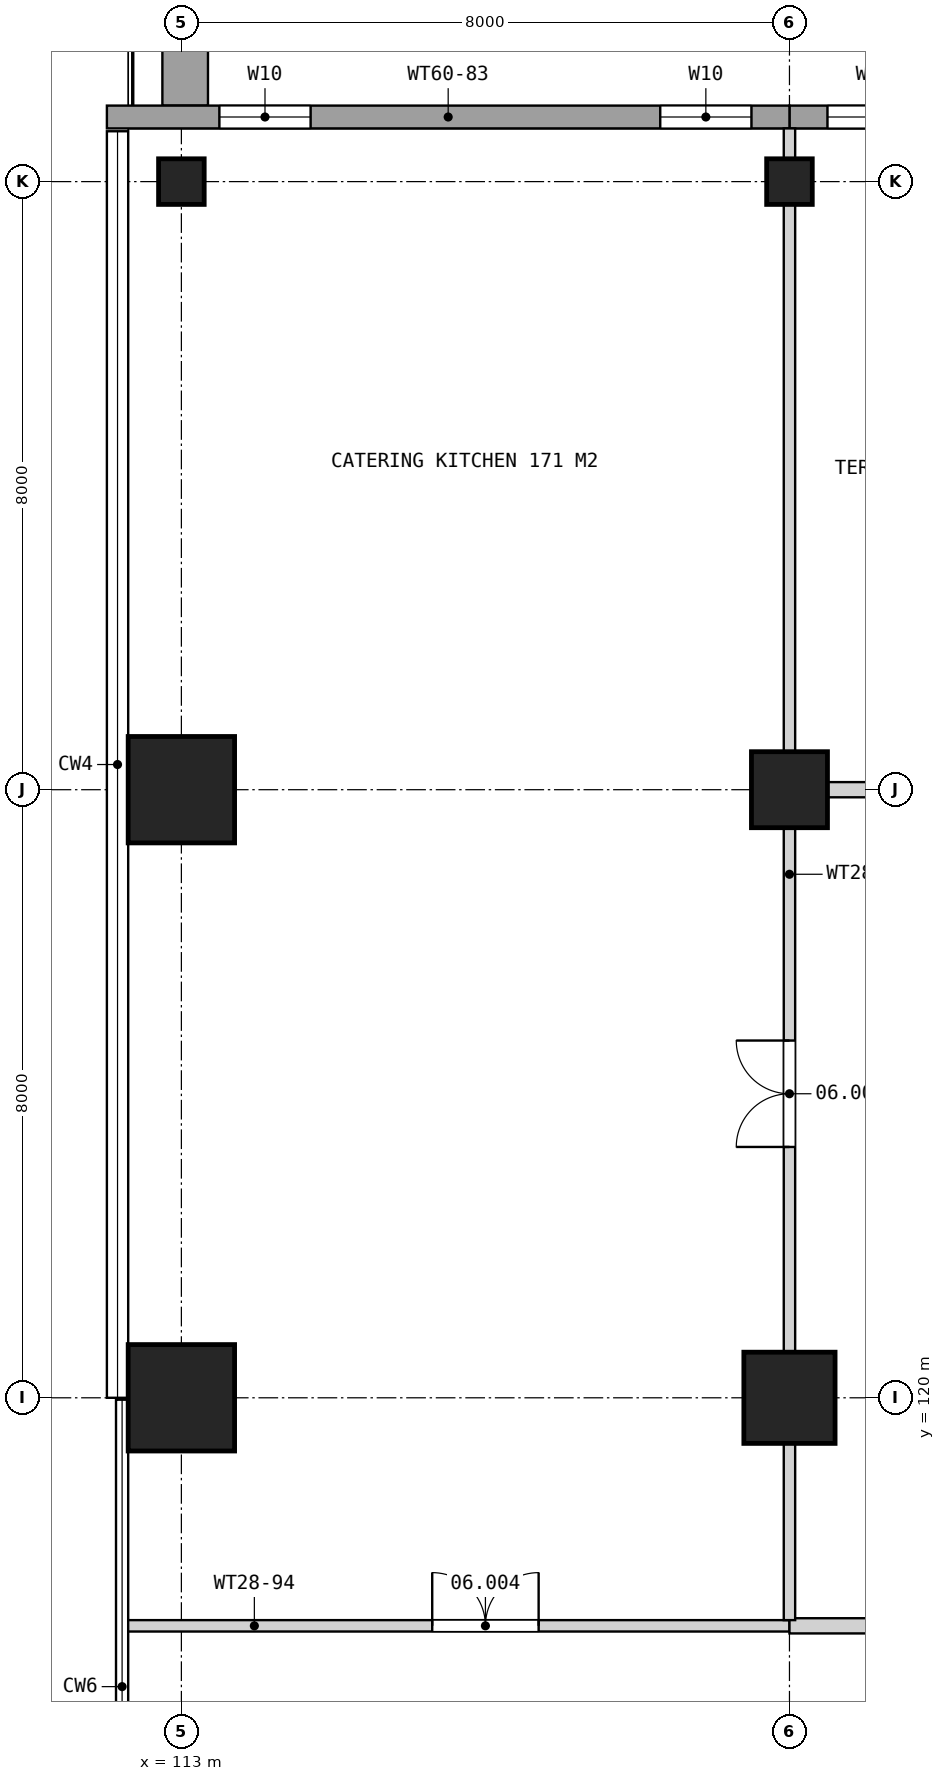
"""IFC4 building model, lengths in metres.
Left out: names, types, materials, properties, quantities, classifications, styles, units other than length and angle.
Written with IfcOpenShell. Run it as: python <this file> out.ifc"""

import sys

from ifc_helpers import new_model, si_unit, direction, frame, frame_2d, origin, origin_2d, place, context, subcontext, project, spatial, rectangle, extrude, element, fill, save


model = new_model("IFC4")
c1 = context("Model", 3, precision=1e-05, world=origin(), true_north=direction((0.0, 1.0)))
c2 = subcontext(c1, "Body", "Model", "MODEL_VIEW")
j1 = project(units=[si_unit("LENGTHUNIT", "METRE"), si_unit("PLANEANGLEUNIT", "RADIAN")], contexts=[c1])
p1 = place(None, origin())
s1 = spatial("IfcSite", under=j1, at=p1, CompositionType="ELEMENT")
p2 = place(p1, origin())
s2 = spatial("IfcBuilding", under=s1, at=p2, CompositionType="ELEMENT")
p3 = place(p2, frame((0.0, 0.0, 47.5)))
s3 = spatial("IfcBuildingStorey", under=s2, at=p3, CompositionType="ELEMENT", Elevation=47.5)
for number, where, z_axis, x_axis in (
    (1, (113.0, 120.0, 0.0), (0.0, 0.0, 1.0), (1.0, 0.0, 0.0)),
    (2, (113.0, 128.0, 0.0), (0.0, 0.0, 1.0), (1.0, 0.0, 0.0)),
):
    element("IfcColumn", number, at=place(p3, frame(where, z_axis=z_axis, x_axis=x_axis)), inside=s3, PredefinedType="COLUMN", context=c2, shape_type="SweptSolid", body=[
        extrude(rectangle(XDim=1.4, YDim=1.4, at=origin_2d()), origin(), (0.0, 0.0, 1.0), 6.0),
    ])
p4 = place(p3, frame((113.0, 136.0, 0.0), z_axis=(0.0, 0.0, 1.0), x_axis=(1.0, 0.0, 0.0)))
e3 = element("IfcColumn", 3, at=p4, inside=s3, PredefinedType="COLUMN", context=c2, shape_type="SweptSolid", body=[
    extrude(rectangle(XDim=0.6, YDim=0.6, at=origin_2d()), origin(), (0.0, 0.0, 1.0), 6.0),
])
p5 = place(p3, frame((121.0, 120.0, 5.2), z_axis=(0.0, 0.0, 1.0), x_axis=(1.0, 0.0, 0.0)))
e4 = element("IfcColumn", 4, at=p5, inside=s3, PredefinedType="COLUMN", context=c2, shape_type="SweptSolid", body=[
    extrude(rectangle(XDim=1.2, YDim=1.2, at=origin_2d()), origin(), (0.0, 0.0, 1.0), 0.8),
])
p6 = place(p3, frame((121.0, 128.0, 5.2), z_axis=(0.0, 0.0, 1.0), x_axis=(1.0, 0.0, 0.0)))
e5 = element("IfcColumn", 5, at=p6, inside=s3, PredefinedType="COLUMN", context=c2, shape_type="SweptSolid", body=[
    extrude(rectangle(XDim=1.0, YDim=1.0, at=origin_2d()), origin(), (0.0, 0.0, 1.0), 0.8),
])
p7 = place(p3, frame((121.0, 136.0, 5.2), z_axis=(0.0, 0.0, 1.0), x_axis=(1.0, 0.0, 0.0)))
e6 = element("IfcColumn", 6, at=p7, inside=s3, PredefinedType="COLUMN", context=c2, shape_type="SweptSolid", body=[
    extrude(rectangle(XDim=0.6, YDim=0.6, at=origin_2d()), origin(), (0.0, 0.0, 1.0), 0.8),
])
p8 = place(p3, frame((113.05, 137.0, 0.0), z_axis=(0.0, 0.0, 1.0), x_axis=(0.0, 1.0, 0.0)))
e7 = element("IfcWall", 7, at=p8, inside=s3, PredefinedType="SOLIDWALL", context=c2, shape_type="SweptSolid", body=[
    extrude(rectangle(XDim=7.25, YDim=0.6, at=frame_2d((3.625, 0.0))), origin(), (0.0, 0.0, 1.0), 0.6),
])
p9 = place(p3, frame((129.0, 136.85, 0.0), z_axis=(0.0, 0.0, 1.0), x_axis=(-1.0, 0.0, 0.0)))
e8 = element("IfcWall", 8, at=p9, inside=s3, PredefinedType="SOLIDWALL", context=c2, shape_type="SweptSolid", body=[
    extrude(rectangle(XDim=8.0, YDim=0.3, at=frame_2d((4.0, 0.0))), origin(), (0.0, 0.0, 1.0), 5.26),
])
p10 = place(p9, frame((2.8, 0.0, 0.0)))
e9 = element("IfcOpeningElement", 9, at=p10, cuts=e8, PredefinedType="OPENING", context=c2, shape_type="SweptSolid", body=[
    extrude(rectangle(XDim=2.4, YDim=2.4, at=frame_2d((1.2, 1.2))), frame((0.0, 0.16, 0.0), z_axis=(0.0, -1.0, 0.0), x_axis=(1.0, 0.0, 0.0)), (0.0, 0.0, 1.0), 0.32),
])
p11 = place(p9, frame((0.5, 0.0, 0.4)))
e10 = element("IfcOpeningElement", 10, at=p11, cuts=e8, PredefinedType="OPENING", context=c2, shape_type="SweptSolid", body=[
    extrude(rectangle(XDim=1.2, YDim=2.2, at=frame_2d((0.6, 1.1))), frame((0.0, 0.16, 0.0), z_axis=(0.0, -1.0, 0.0), x_axis=(1.0, 0.0, 0.0)), (0.0, 0.0, 1.0), 0.32),
])
p12 = place(p9, frame((6.3, 0.0, 0.4)))
e11 = element("IfcOpeningElement", 11, at=p12, cuts=e8, PredefinedType="OPENING", context=c2, shape_type="SweptSolid", body=[
    extrude(rectangle(XDim=1.2, YDim=2.2, at=frame_2d((0.6, 1.1))), frame((0.0, 0.16, 0.0), z_axis=(0.0, -1.0, 0.0), x_axis=(1.0, 0.0, 0.0)), (0.0, 0.0, 1.0), 0.32),
])
p13 = place(p3, frame((121.0, 136.85, 0.0), z_axis=(0.0, 0.0, 1.0), x_axis=(-1.0, 0.0, 0.0)))
e12 = element("IfcWall", 12, at=p13, inside=s3, PredefinedType="SOLIDWALL", context=c2, shape_type="SweptSolid", body=[
    extrude(rectangle(XDim=8.98, YDim=0.3, at=frame_2d((4.49, 0.0))), origin(), (0.0, 0.0, 1.0), 5.26),
])
p14 = place(p13, frame((0.5, 0.0, 0.4)))
e13 = element("IfcOpeningElement", 13, at=p14, cuts=e12, PredefinedType="OPENING", context=c2, shape_type="SweptSolid", body=[
    extrude(rectangle(XDim=1.2, YDim=2.2, at=frame_2d((0.6, 1.1))), frame((0.0, 0.16, 0.0), z_axis=(0.0, -1.0, 0.0), x_axis=(1.0, 0.0, 0.0)), (0.0, 0.0, 1.0), 0.32),
])
p15 = place(p13, frame((6.3, 0.0, 0.4)))
e14 = element("IfcOpeningElement", 14, at=p15, cuts=e12, PredefinedType="OPENING", context=c2, shape_type="SweptSolid", body=[
    extrude(rectangle(XDim=1.2, YDim=2.2, at=frame_2d((0.6, 1.1))), frame((0.0, 0.16, 0.0), z_axis=(0.0, -1.0, 0.0), x_axis=(1.0, 0.0, 0.0)), (0.0, 0.0, 1.0), 0.32),
])
p16 = place(p3, frame((112.2, 117.0, 0.0), z_axis=(0.0, 0.0, 1.0), x_axis=(1.0, 0.0, 0.0)))
e15 = element("IfcWall", 15, at=p16, inside=s3, PredefinedType="SOLIDWALL", context=c2, shape_type="SweptSolid", body=[
    extrude(rectangle(XDim=8.8, YDim=0.15, at=frame_2d((4.4, 0.0))), origin(), (0.0, 0.0, 1.0), 5.26),
])
p17 = place(p16, frame((4.1, 0.0, 0.0)))
e16 = element("IfcOpeningElement", 16, at=p17, cuts=e15, PredefinedType="OPENING", context=c2, shape_type="SweptSolid", body=[
    extrude(rectangle(XDim=1.4, YDim=2.2, at=frame_2d((0.7, 1.1))), frame((0.0, 0.085, 0.0), z_axis=(0.0, -1.0, 0.0), x_axis=(1.0, 0.0, 0.0)), (0.0, 0.0, 1.0), 0.17),
])
p18 = place(p3, frame((121.0, 117.0, 0.0), z_axis=(0.0, 0.0, 1.0), x_axis=(1.0, 0.0, 0.0)))
e17 = element("IfcWall", 17, at=p18, inside=s3, PredefinedType="PARTITIONING", context=c2, shape_type="SweptSolid", body=[
    extrude(rectangle(XDim=16.8, YDim=0.2, at=frame_2d((8.4, 0.0))), origin(), (0.0, 0.0, 1.0), 5.26),
])
p19 = place(p18, frame((3.1, 0.0, 0.0)))
e18 = element("IfcOpeningElement", 18, at=p19, cuts=e17, PredefinedType="OPENING", context=c2, shape_type="SweptSolid", body=[
    extrude(rectangle(XDim=1.8, YDim=2.4, at=frame_2d((0.9, 1.2))), frame((0.0, 0.11, 0.0), z_axis=(0.0, -1.0, 0.0), x_axis=(1.0, 0.0, 0.0)), (0.0, 0.0, 1.0), 0.22),
])
p20 = place(p18, frame((11.5, 0.0, 0.0)))
e19 = element("IfcOpeningElement", 19, at=p20, cuts=e17, PredefinedType="OPENING", context=c2, shape_type="SweptSolid", body=[
    extrude(rectangle(XDim=1.0, YDim=2.1, at=frame_2d((0.5, 1.05))), frame((0.0, 0.11, 0.0), z_axis=(0.0, -1.0, 0.0), x_axis=(1.0, 0.0, 0.0)), (0.0, 0.0, 1.0), 0.22),
])
p21 = place(p3, frame((121.075, 128.0, 0.0), z_axis=(0.0, 0.0, 1.0), x_axis=(1.0, 0.0, 0.0)))
e20 = element("IfcWall", 20, at=p21, inside=s3, PredefinedType="PARTITIONING", context=c2, shape_type="SweptSolid", body=[
    extrude(rectangle(XDim=7.85, YDim=0.2, at=frame_2d((3.925, 0.0))), origin(), (0.0, 0.0, 1.0), 2.7),
])
p22 = place(p21, frame((3.025, 0.0, 0.0)))
e21 = element("IfcOpeningElement", 21, at=p22, cuts=e20, PredefinedType="OPENING", context=c2, shape_type="SweptSolid", body=[
    extrude(rectangle(XDim=1.8, YDim=2.4, at=frame_2d((0.9, 1.2))), frame((0.0, 0.11, 0.0), z_axis=(0.0, -1.0, 0.0), x_axis=(1.0, 0.0, 0.0)), (0.0, 0.0, 1.0), 0.22),
])
p23 = place(p3, frame((121.0, 117.075, 0.0), z_axis=(0.0, 0.0, 1.0), x_axis=(0.0, 1.0, 0.0)))
e22 = element("IfcWall", 22, at=p23, inside=s3, PredefinedType="SOLIDWALL", context=c2, shape_type="SweptSolid", body=[
    extrude(rectangle(XDim=19.625, YDim=0.15, at=frame_2d((9.812, 0.0))), origin(), (0.0, 0.0, 1.0), 2.7),
])
p24 = place(p23, frame((6.225, 0.0, 0.0)))
e23 = element("IfcOpeningElement", 23, at=p24, cuts=e22, PredefinedType="OPENING", context=c2, shape_type="SweptSolid", body=[
    extrude(rectangle(XDim=1.4, YDim=2.2, at=frame_2d((0.7, 1.1))), frame((0.0, 0.085, 0.0), z_axis=(0.0, -1.0, 0.0), x_axis=(1.0, 0.0, 0.0)), (0.0, 0.0, 1.0), 0.17),
])
p25 = place(p12, origin())
e24 = element("IfcWindow", 24, at=p25, inside=s3, PartitioningType="SINGLE_PANEL", PredefinedType="WINDOW", context=c2, shape_type="SweptSolid", body=[
    extrude(rectangle(XDim=1.2, YDim=2.2, at=frame_2d((0.6, 1.1))), frame((0.0, 0.03, 0.0), z_axis=(0.0, -1.0, 0.0), x_axis=(1.0, 0.0, 0.0)), (0.0, 0.0, 1.0), 0.06),
])
fill(e11, e24)
p26 = place(p14, origin())
e25 = element("IfcWindow", 25, at=p26, inside=s3, PartitioningType="SINGLE_PANEL", PredefinedType="WINDOW", context=c2, shape_type="SweptSolid", body=[
    extrude(rectangle(XDim=1.2, YDim=2.2, at=frame_2d((0.6, 1.1))), frame((0.0, 0.03, 0.0), z_axis=(0.0, -1.0, 0.0), x_axis=(1.0, 0.0, 0.0)), (0.0, 0.0, 1.0), 0.06),
])
fill(e13, e25)
p27 = place(p15, origin())
e26 = element("IfcWindow", 26, at=p27, inside=s3, PartitioningType="SINGLE_PANEL", PredefinedType="WINDOW", context=c2, shape_type="SweptSolid", body=[
    extrude(rectangle(XDim=1.2, YDim=2.2, at=frame_2d((0.6, 1.1))), frame((0.0, 0.03, 0.0), z_axis=(0.0, -1.0, 0.0), x_axis=(1.0, 0.0, 0.0)), (0.0, 0.0, 1.0), 0.06),
])
fill(e14, e26)
p28 = place(p17, origin())
e27 = element("IfcDoor", 27, at=p28, inside=s3, OperationType="DOUBLE_DOOR_SINGLE_SWING", PredefinedType="DOOR", context=c2, shape_type="SweptSolid", body=[
    extrude(rectangle(XDim=1.4, YDim=2.2, at=frame_2d((0.7, 1.1))), frame((0.0, 0.025, 0.0), z_axis=(0.0, -1.0, 0.0), x_axis=(1.0, 0.0, 0.0)), (0.0, 0.0, 1.0), 0.05),
])
fill(e16, e27)
p29 = place(p24, origin())
e28 = element("IfcDoor", 28, at=p29, inside=s3, OperationType="DOUBLE_DOOR_SINGLE_SWING", PredefinedType="DOOR", context=c2, shape_type="SweptSolid", body=[
    extrude(rectangle(XDim=1.4, YDim=2.2, at=frame_2d((0.7, 1.1))), frame((0.0, 0.025, 0.0), z_axis=(0.0, -1.0, 0.0), x_axis=(1.0, 0.0, 0.0)), (0.0, 0.0, 1.0), 0.05),
])
fill(e23, e28)
save(model, sys.argv[1])
